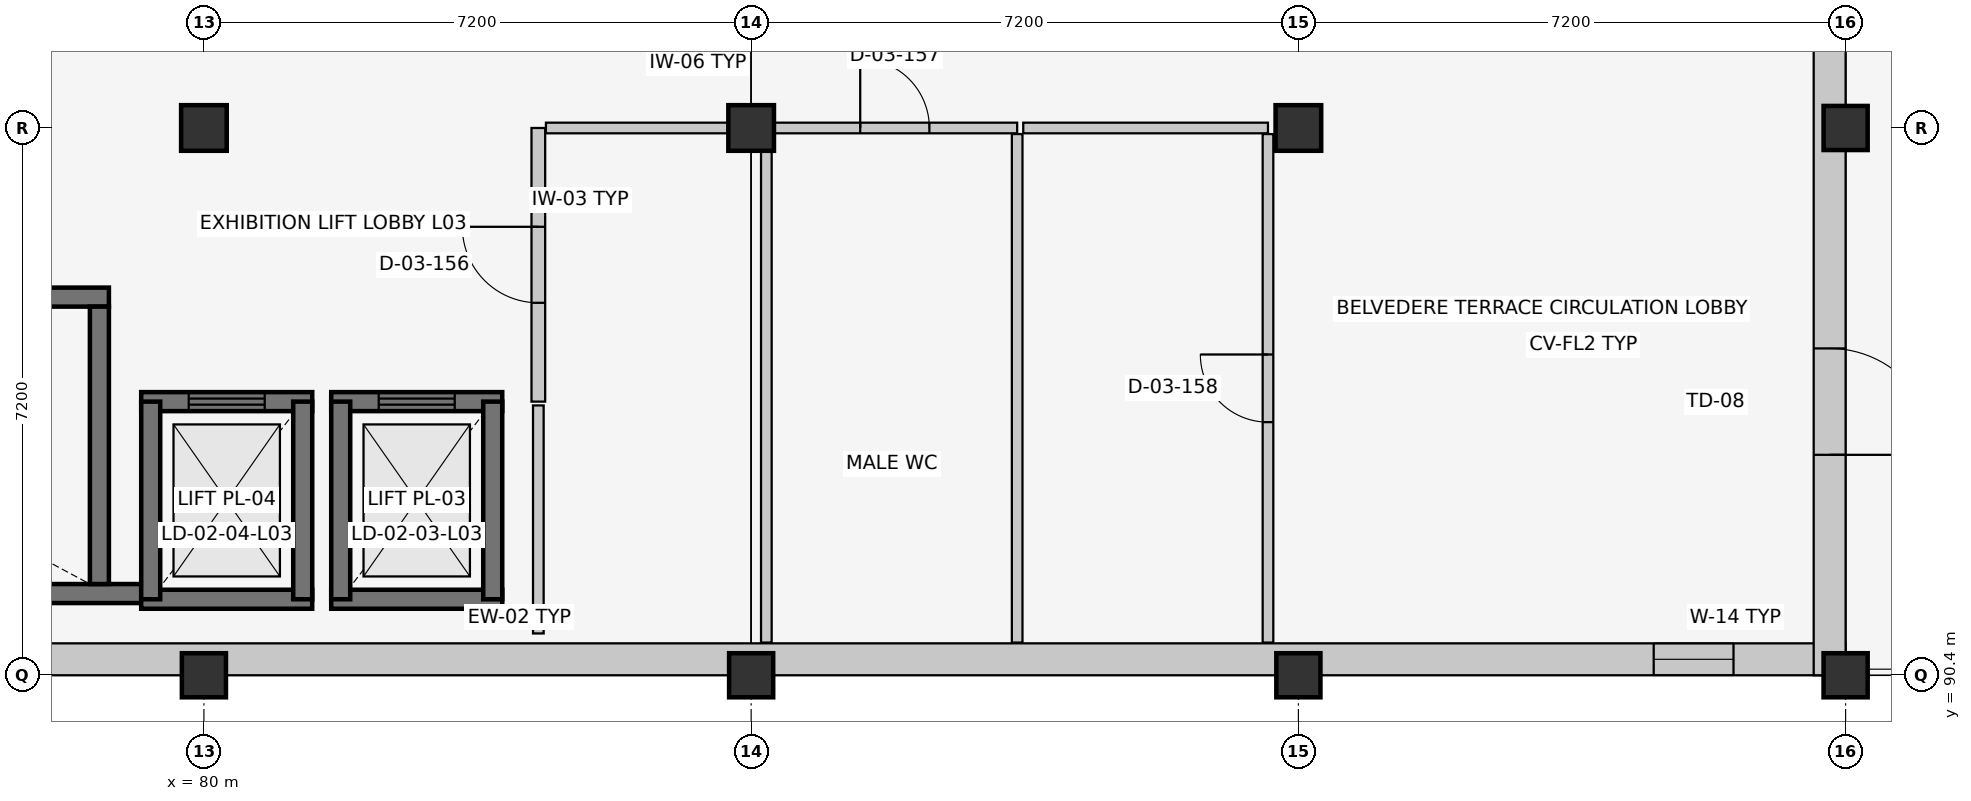
"""IFC4 building model, lengths in metres.
Left out: names, types, materials, properties, quantities, classifications, styles, units other than length and angle.
Written with IfcOpenShell. Run it as: python <this file> out.ifc"""

import sys

from ifc_helpers import new_model, si_unit, direction, frame, frame_2d, origin, origin_2d, place, context, subcontext, project, spatial, rectangle, extrude, element, fill, save


model = new_model("IFC4")
c1 = context("Model", 3, precision=1e-05, world=origin(), true_north=direction((0.0, 1.0)))
c2 = subcontext(c1, "Body", "Model", "MODEL_VIEW")
j1 = project(units=[si_unit("LENGTHUNIT", "METRE"), si_unit("PLANEANGLEUNIT", "RADIAN")], contexts=[c1])
p1 = place(None, origin())
s1 = spatial("IfcSite", under=j1, at=p1, CompositionType="ELEMENT")
p2 = place(p1, origin())
s2 = spatial("IfcBuilding", under=s1, at=p2, CompositionType="ELEMENT")
p3 = place(p2, frame((0.0, 0.0, 13.8)))
s3 = spatial("IfcBuildingStorey", under=s2, at=p3, CompositionType="ELEMENT", Elevation=13.8)
p4 = place(p3, frame((80.0, 90.4, 0.0), z_axis=(0.0, 0.0, 1.0), x_axis=(1.0, 0.0, 0.0)))
e1 = element("IfcColumn", 1, at=p4, inside=s3, PredefinedType="COLUMN", context=c2, shape_type="SweptSolid", body=[
    extrude(rectangle(XDim=0.58, YDim=0.58, at=origin_2d()), origin(), (0.0, 0.0, 1.0), 4.2),
])
p5 = place(p3, frame((80.0, 97.6, 0.0), z_axis=(0.0, 0.0, 1.0), x_axis=(1.0, 0.0, 0.0)))
e2 = element("IfcColumn", 2, at=p5, inside=s3, PredefinedType="COLUMN", context=c2, shape_type="SweptSolid", body=[
    extrude(rectangle(XDim=0.6, YDim=0.6, at=origin_2d()), origin(), (0.0, 0.0, 1.0), 4.2),
])
p6 = place(p3, frame((87.2, 90.4, 0.0), z_axis=(0.0, 0.0, 1.0), x_axis=(1.0, 0.0, 0.0)))
e3 = element("IfcColumn", 3, at=p6, inside=s3, PredefinedType="COLUMN", context=c2, shape_type="SweptSolid", body=[
    extrude(rectangle(XDim=0.58, YDim=0.58, at=origin_2d()), origin(), (0.0, 0.0, 1.0), 4.2),
])
p7 = place(p3, frame((87.2, 97.6, 0.0), z_axis=(0.0, 0.0, 1.0), x_axis=(1.0, 0.0, 0.0)))
e4 = element("IfcColumn", 4, at=p7, inside=s3, PredefinedType="COLUMN", context=c2, shape_type="SweptSolid", body=[
    extrude(rectangle(XDim=0.6, YDim=0.6, at=origin_2d()), origin(), (0.0, 0.0, 1.0), 4.2),
])
p8 = place(p3, frame((94.4, 90.4, 0.0), z_axis=(0.0, 0.0, 1.0), x_axis=(1.0, 0.0, 0.0)))
e5 = element("IfcColumn", 5, at=p8, inside=s3, PredefinedType="COLUMN", context=c2, shape_type="SweptSolid", body=[
    extrude(rectangle(XDim=0.58, YDim=0.58, at=origin_2d()), origin(), (0.0, 0.0, 1.0), 4.2),
])
p9 = place(p3, frame((94.4, 97.6, 0.0), z_axis=(0.0, 0.0, 1.0), x_axis=(1.0, 0.0, 0.0)))
e6 = element("IfcColumn", 6, at=p9, inside=s3, PredefinedType="COLUMN", context=c2, shape_type="SweptSolid", body=[
    extrude(rectangle(XDim=0.6, YDim=0.6, at=origin_2d()), origin(), (0.0, 0.0, 1.0), 4.2),
])
for number, where, z_axis, x_axis in (
    (7, (101.6, 90.4, 0.0), (0.0, 0.0, 1.0), (1.0, 0.0, 0.0)),
    (8, (101.6, 97.6, 0.0), (0.0, 0.0, 1.0), (1.0, 0.0, 0.0)),
):
    element("IfcColumn", number, at=place(p3, frame(where, z_axis=z_axis, x_axis=x_axis)), inside=s3, PredefinedType="COLUMN", context=c2, shape_type="SweptSolid", body=[
        extrude(rectangle(XDim=0.58, YDim=0.58, at=origin_2d()), origin(), (0.0, 0.0, 1.0), 4.2),
    ])
p10 = place(p3, frame((101.6, 90.61, 0.0), z_axis=(0.0, 0.0, 1.0), x_axis=(-1.0, 0.0, 0.0)))
e9 = element("IfcWall", 9, at=p10, inside=s3, PredefinedType="SOLIDWALL", context=c2, shape_type="SweptSolid", body=[
    extrude(rectangle(XDim=36.0, YDim=0.42, at=frame_2d((18.0, 0.0))), origin(), (0.0, 0.0, 1.0), 3.175),
])
p11 = place(p10, frame((1.475, 0.0, 0.9)))
e10 = element("IfcOpeningElement", 10, at=p11, cuts=e9, PredefinedType="OPENING", context=c2, shape_type="SweptSolid", body=[
    extrude(rectangle(XDim=1.05, YDim=1.6, at=frame_2d((0.525, 0.8))), frame((0.0, 0.222, 0.0), z_axis=(0.0, -1.0, 0.0), x_axis=(1.0, 0.0, 0.0)), (0.0, 0.0, 1.0), 0.444),
])
p12 = place(p10, frame((25.44, 0.0, 0.9)))
e11 = element("IfcOpeningElement", 11, at=p12, cuts=e9, PredefinedType="OPENING", context=c2, shape_type="SweptSolid", body=[
    extrude(rectangle(XDim=1.12, YDim=1.75, at=frame_2d((0.56, 0.875))), frame((0.0, 0.222, 0.0), z_axis=(0.0, -1.0, 0.0), x_axis=(1.0, 0.0, 0.0)), (0.0, 0.0, 1.0), 0.444),
])
p13 = place(p10, frame((33.33, 0.0, 0.9)))
e12 = element("IfcOpeningElement", 12, at=p13, cuts=e9, PredefinedType="OPENING", context=c2, shape_type="SweptSolid", body=[
    extrude(rectangle(XDim=1.34, YDim=1.75, at=frame_2d((0.67, 0.875))), frame((0.0, 0.222, 0.0), z_axis=(0.0, -1.0, 0.0), x_axis=(1.0, 0.0, 0.0)), (0.0, 0.0, 1.0), 0.444),
])
p14 = place(p3, frame((101.39, 112.0, 0.0), z_axis=(0.0, 0.0, 1.0), x_axis=(0.0, -1.0, 0.0)))
e13 = element("IfcWall", 13, at=p14, inside=s3, PredefinedType="SOLIDWALL", context=c2, shape_type="SweptSolid", body=[
    extrude(rectangle(XDim=21.6, YDim=0.42, at=frame_2d((10.8, 0.0))), origin(), (0.0, 0.0, 1.0), 3.215),
])
p15 = place(p14, frame((17.3, 0.0, 0.0)))
e14 = element("IfcOpeningElement", 14, at=p15, cuts=e13, PredefinedType="OPENING", context=c2, shape_type="SweptSolid", body=[
    extrude(rectangle(XDim=1.4, YDim=2.2, at=frame_2d((0.7, 1.1))), frame((0.0, 0.222, 0.0), z_axis=(0.0, -1.0, 0.0), x_axis=(1.0, 0.0, 0.0)), (0.0, 0.0, 1.0), 0.444),
])
p16 = place(p14, frame((1.08, 0.0, 0.9)))
e15 = element("IfcOpeningElement", 15, at=p16, cuts=e13, PredefinedType="OPENING", context=c2, shape_type="SweptSolid", body=[
    extrude(rectangle(XDim=1.44, YDim=1.75, at=frame_2d((0.72, 0.875))), frame((0.0, 0.222, 0.0), z_axis=(0.0, -1.0, 0.0), x_axis=(1.0, 0.0, 0.0)), (0.0, 0.0, 1.0), 0.444),
])
p17 = place(p14, frame((4.65, 0.0, 0.9)))
e16 = element("IfcOpeningElement", 16, at=p17, cuts=e13, PredefinedType="OPENING", context=c2, shape_type="SweptSolid", body=[
    extrude(rectangle(XDim=1.5, YDim=1.75, at=frame_2d((0.75, 0.875))), frame((0.0, 0.222, 0.0), z_axis=(0.0, -1.0, 0.0), x_axis=(1.0, 0.0, 0.0)), (0.0, 0.0, 1.0), 0.444),
])
p18 = place(p14, frame((8.55, 0.0, 0.9)))
e17 = element("IfcOpeningElement", 17, at=p18, cuts=e13, PredefinedType="OPENING", context=c2, shape_type="SweptSolid", body=[
    extrude(rectangle(XDim=0.9, YDim=1.35, at=frame_2d((0.45, 0.675))), frame((0.0, 0.222, 0.0), z_axis=(0.0, -1.0, 0.0), x_axis=(1.0, 0.0, 0.0)), (0.0, 0.0, 1.0), 0.444),
])
p19 = place(p14, frame((12.1, 0.0, 0.9)))
e18 = element("IfcOpeningElement", 18, at=p19, cuts=e13, PredefinedType="OPENING", context=c2, shape_type="SweptSolid", body=[
    extrude(rectangle(XDim=1.0, YDim=1.35, at=frame_2d((0.5, 0.675))), frame((0.0, 0.222, 0.0), z_axis=(0.0, -1.0, 0.0), x_axis=(1.0, 0.0, 0.0)), (0.0, 0.0, 1.0), 0.444),
])
p20 = place(p3, frame((69.75, 91.475, 0.0), z_axis=(0.0, 0.0, 1.0), x_axis=(1.0, 0.0, 0.0)))
e19 = element("IfcWall", 19, at=p20, inside=s3, PredefinedType="SHEAR", context=c2, shape_type="SweptSolid", body=[
    extrude(rectangle(XDim=9.57, YDim=0.25, at=frame_2d((4.785, 0.0))), origin(), (0.0, 0.0, 1.0), 3.88),
])
p21 = place(p3, frame((78.75, 95.375, 0.0), z_axis=(0.0, 0.0, 1.0), x_axis=(-1.0, 0.0, 0.0)))
e20 = element("IfcWall", 20, at=p21, inside=s3, PredefinedType="SHEAR", context=c2, shape_type="SweptSolid", body=[
    extrude(rectangle(XDim=9.0, YDim=0.25, at=frame_2d((4.5, 0.0))), origin(), (0.0, 0.0, 1.0), 3.88),
])
p22 = place(p3, frame((78.625, 91.6, 0.0), z_axis=(0.0, 0.0, 1.0), x_axis=(0.0, 1.0, 0.0)))
e21 = element("IfcWall", 21, at=p22, inside=s3, PredefinedType="SHEAR", context=c2, shape_type="SweptSolid", body=[
    extrude(rectangle(XDim=3.65, YDim=0.25, at=frame_2d((1.825, 0.0))), origin(), (0.0, 0.0, 1.0), 3.88),
])
p23 = place(p3, frame((79.175, 91.4, 0.0), z_axis=(0.0, 0.0, 1.0), x_axis=(1.0, 0.0, 0.0)))
e22 = element("IfcWall", 22, at=p23, inside=s3, PredefinedType="SHEAR", context=c2, shape_type="SweptSolid", body=[
    extrude(rectangle(XDim=2.25, YDim=0.25, at=frame_2d((1.125, 0.0))), origin(), (0.0, 0.0, 1.0), 3.88),
])
p24 = place(p3, frame((81.425, 94.0, 0.0), z_axis=(0.0, 0.0, 1.0), x_axis=(-1.0, 0.0, 0.0)))
e23 = element("IfcWall", 23, at=p24, inside=s3, PredefinedType="SHEAR", context=c2, shape_type="SweptSolid", body=[
    extrude(rectangle(XDim=2.25, YDim=0.25, at=frame_2d((1.125, 0.0))), origin(), (0.0, 0.0, 1.0), 3.88),
])
p25 = place(p24, frame((0.625, 0.0, 0.0)))
e24 = element("IfcOpeningElement", 24, at=p25, cuts=e23, PredefinedType="OPENING", context=c2, shape_type="SweptSolid", body=[
    extrude(rectangle(XDim=1.0, YDim=2.15, at=frame_2d((0.5, 1.075))), frame((0.0, 0.137, 0.0), z_axis=(0.0, -1.0, 0.0), x_axis=(1.0, 0.0, 0.0)), (0.0, 0.0, 1.0), 0.274),
])
for number, where, z_axis, x_axis in (
    (25, (79.3, 94.0, 0.0), (0.0, 0.0, 1.0), (0.0, -1.0, 0.0)),
    (26, (81.3, 91.4, 0.0), (0.0, 0.0, 1.0), (0.0, 1.0, 0.0)),
):
    element("IfcWall", number, at=place(p3, frame(where, z_axis=z_axis, x_axis=x_axis)), inside=s3, PredefinedType="SHEAR", context=c2, shape_type="SweptSolid", body=[
        extrude(rectangle(XDim=2.6, YDim=0.25, at=frame_2d((1.3, 0.0))), origin(), (0.0, 0.0, 1.0), 3.88),
    ])
p26 = place(p3, frame((81.675, 91.4, 0.0), z_axis=(0.0, 0.0, 1.0), x_axis=(1.0, 0.0, 0.0)))
e27 = element("IfcWall", 27, at=p26, inside=s3, PredefinedType="SHEAR", context=c2, shape_type="SweptSolid", body=[
    extrude(rectangle(XDim=2.25, YDim=0.25, at=frame_2d((1.125, 0.0))), origin(), (0.0, 0.0, 1.0), 3.88),
])
p27 = place(p3, frame((83.925, 94.0, 0.0), z_axis=(0.0, 0.0, 1.0), x_axis=(-1.0, 0.0, 0.0)))
e28 = element("IfcWall", 28, at=p27, inside=s3, PredefinedType="SHEAR", context=c2, shape_type="SweptSolid", body=[
    extrude(rectangle(XDim=2.25, YDim=0.25, at=frame_2d((1.125, 0.0))), origin(), (0.0, 0.0, 1.0), 3.88),
])
p28 = place(p27, frame((0.625, 0.0, 0.0)))
e29 = element("IfcOpeningElement", 29, at=p28, cuts=e28, PredefinedType="OPENING", context=c2, shape_type="SweptSolid", body=[
    extrude(rectangle(XDim=1.0, YDim=2.15, at=frame_2d((0.5, 1.075))), frame((0.0, 0.137, 0.0), z_axis=(0.0, -1.0, 0.0), x_axis=(1.0, 0.0, 0.0)), (0.0, 0.0, 1.0), 0.274),
])
for number, where, z_axis, x_axis in (
    (30, (81.8, 94.0, 0.0), (0.0, 0.0, 1.0), (0.0, -1.0, 0.0)),
    (31, (83.8, 91.4, 0.0), (0.0, 0.0, 1.0), (0.0, 1.0, 0.0)),
):
    element("IfcWall", number, at=place(p3, frame(where, z_axis=z_axis, x_axis=x_axis)), inside=s3, PredefinedType="SHEAR", context=c2, shape_type="SweptSolid", body=[
        extrude(rectangle(XDim=2.6, YDim=0.25, at=frame_2d((1.3, 0.0))), origin(), (0.0, 0.0, 1.0), 3.88),
    ])
p29 = place(p3, frame((84.4, 94.0, 0.0), z_axis=(0.0, 0.0, 1.0), x_axis=(0.0, 1.0, 0.0)))
e32 = element("IfcWall", 32, at=p29, inside=s3, PredefinedType="PARTITIONING", context=c2, shape_type="SweptSolid", body=[
    extrude(rectangle(XDim=3.6, YDim=0.18, at=frame_2d((1.8, 0.0))), origin(), (0.0, 0.0, 1.0), 3.88),
])
p30 = place(p29, frame((1.3, 0.0, 0.0)))
e33 = element("IfcOpeningElement", 33, at=p30, cuts=e32, PredefinedType="OPENING", context=c2, shape_type="SweptSolid", body=[
    extrude(rectangle(XDim=1.0, YDim=2.1, at=frame_2d((0.5, 1.05))), frame((0.0, 0.102, 0.0), z_axis=(0.0, -1.0, 0.0), x_axis=(1.0, 0.0, 0.0)), (0.0, 0.0, 1.0), 0.204),
])
p31 = place(p3, frame((84.5, 97.6, 0.0), z_axis=(0.0, 0.0, 1.0), x_axis=(1.0, 0.0, 0.0)))
e34 = element("IfcWall", 34, at=p31, inside=s3, PredefinedType="PARTITIONING", context=c2, shape_type="SweptSolid", body=[
    extrude(rectangle(XDim=2.9, YDim=0.14, at=frame_2d((1.45, 0.0))), origin(), (0.0, 0.0, 1.0), 3.005),
])
p32 = place(p3, frame((87.4, 90.83, 0.0), z_axis=(0.0, 0.0, 1.0), x_axis=(0.0, 1.0, 0.0)))
e35 = element("IfcWall", 35, at=p32, inside=s3, PredefinedType="PARTITIONING", context=c2, shape_type="SweptSolid", body=[
    extrude(rectangle(XDim=6.69, YDim=0.14, at=frame_2d((3.345, 0.0))), origin(), (0.0, 0.0, 1.0), 3.255),
])
p33 = place(p3, frame((87.48, 97.6, 0.0), z_axis=(0.0, 0.0, 1.0), x_axis=(1.0, 0.0, 0.0)))
e36 = element("IfcWall", 36, at=p33, inside=s3, PredefinedType="PARTITIONING", context=c2, shape_type="SweptSolid", body=[
    extrude(rectangle(XDim=3.22, YDim=0.14, at=frame_2d((1.61, 0.0))), origin(), (0.0, 0.0, 1.0), 3.205),
])
p34 = place(p33, frame((1.155, 0.0, 0.0)))
e37 = element("IfcOpeningElement", 37, at=p34, cuts=e36, PredefinedType="OPENING", context=c2, shape_type="SweptSolid", body=[
    extrude(rectangle(XDim=0.91, YDim=2.06, at=frame_2d((0.455, 1.03))), frame((0.0, 0.082, 0.0), z_axis=(0.0, -1.0, 0.0), x_axis=(1.0, 0.0, 0.0)), (0.0, 0.0, 1.0), 0.164),
])
p35 = place(p3, frame((90.7, 90.83, 0.0), z_axis=(0.0, 0.0, 1.0), x_axis=(0.0, 1.0, 0.0)))
e38 = element("IfcWall", 38, at=p35, inside=s3, PredefinedType="PARTITIONING", context=c2, shape_type="SweptSolid", body=[
    extrude(rectangle(XDim=6.69, YDim=0.14, at=frame_2d((3.345, 0.0))), origin(), (0.0, 0.0, 1.0), 3.595),
])
p36 = place(p3, frame((90.78, 97.6, 0.0), z_axis=(0.0, 0.0, 1.0), x_axis=(1.0, 0.0, 0.0)))
e39 = element("IfcWall", 39, at=p36, inside=s3, PredefinedType="PARTITIONING", context=c2, shape_type="SweptSolid", body=[
    extrude(rectangle(XDim=3.22, YDim=0.14, at=frame_2d((1.61, 0.0))), origin(), (0.0, 0.0, 1.0), 3.205),
])
p37 = place(p3, frame((94.0, 90.83, 0.0), z_axis=(0.0, 0.0, 1.0), x_axis=(0.0, 1.0, 0.0)))
e40 = element("IfcWall", 40, at=p37, inside=s3, PredefinedType="PARTITIONING", context=c2, shape_type="SweptSolid", body=[
    extrude(rectangle(XDim=6.69, YDim=0.14, at=frame_2d((3.345, 0.0))), origin(), (0.0, 0.0, 1.0), 3.88),
])
p38 = place(p37, frame((2.9, 0.0, 0.0)))
e41 = element("IfcOpeningElement", 41, at=p38, cuts=e40, PredefinedType="OPENING", context=c2, shape_type="SweptSolid", body=[
    extrude(rectangle(XDim=0.89, YDim=2.05, at=frame_2d((0.445, 1.025))), frame((0.0, 0.082, 0.0), z_axis=(0.0, -1.0, 0.0), x_axis=(1.0, 0.0, 0.0)), (0.0, 0.0, 1.0), 0.164),
])
p39 = place(p3, frame((84.4, 90.95, 0.0), z_axis=(0.0, 0.0, 1.0), x_axis=(0.0, 1.0, 0.0)))
e42 = element("IfcWall", 42, at=p39, inside=s3, PredefinedType="PARTITIONING", context=c2, shape_type="SweptSolid", body=[
    extrude(rectangle(XDim=3.0, YDim=0.14, at=frame_2d((1.5, 0.0))), origin(), (0.0, 0.0, 1.0), 3.88),
])
p40 = place(p11, origin())
e43 = element("IfcWindow", 43, at=p40, inside=s3, PartitioningType="SINGLE_PANEL", PredefinedType="WINDOW", context=c2, shape_type="SweptSolid", body=[
    extrude(rectangle(XDim=1.05, YDim=1.6, at=frame_2d((0.525, 0.8))), frame((0.0, 0.03, 0.0), z_axis=(0.0, -1.0, 0.0), x_axis=(1.0, 0.0, 0.0)), (0.0, 0.0, 1.0), 0.06),
])
fill(e10, e43)
p41 = place(p15, origin())
e44 = element("IfcDoor", 44, at=p41, inside=s3, OperationType="SINGLE_SWING_RIGHT", PredefinedType="DOOR", context=c2, shape_type="SweptSolid", body=[
    extrude(rectangle(XDim=1.4, YDim=2.2, at=frame_2d((0.7, 1.1))), frame((0.0, 0.025, 0.0), z_axis=(0.0, -1.0, 0.0), x_axis=(1.0, 0.0, 0.0)), (0.0, 0.0, 1.0), 0.05),
])
fill(e14, e44)
p42 = place(p25, origin())
e45 = element("IfcDoor", 45, at=p42, inside=s3, OperationType="SLIDING_TO_LEFT", PredefinedType="DOOR", context=c2, shape_type="SweptSolid", body=[
    extrude(rectangle(XDim=1.0, YDim=2.15, at=frame_2d((0.5, 1.075))), frame((0.0, 0.025, 0.0), z_axis=(0.0, -1.0, 0.0), x_axis=(1.0, 0.0, 0.0)), (0.0, 0.0, 1.0), 0.05),
])
fill(e24, e45)
p43 = place(p28, origin())
e46 = element("IfcDoor", 46, at=p43, inside=s3, OperationType="SLIDING_TO_LEFT", PredefinedType="DOOR", context=c2, shape_type="SweptSolid", body=[
    extrude(rectangle(XDim=1.0, YDim=2.15, at=frame_2d((0.5, 1.075))), frame((0.0, 0.025, 0.0), z_axis=(0.0, -1.0, 0.0), x_axis=(1.0, 0.0, 0.0)), (0.0, 0.0, 1.0), 0.05),
])
fill(e29, e46)
p44 = place(p30, origin())
e47 = element("IfcDoor", 47, at=p44, inside=s3, OperationType="SINGLE_SWING_RIGHT", PredefinedType="DOOR", context=c2, shape_type="SweptSolid", body=[
    extrude(rectangle(XDim=1.0, YDim=2.1, at=frame_2d((0.5, 1.05))), frame((0.0, 0.025, 0.0), z_axis=(0.0, -1.0, 0.0), x_axis=(1.0, 0.0, 0.0)), (0.0, 0.0, 1.0), 0.05),
])
fill(e33, e47)
p45 = place(p34, origin())
e48 = element("IfcDoor", 48, at=p45, inside=s3, OperationType="SINGLE_SWING_LEFT", PredefinedType="DOOR", context=c2, shape_type="SweptSolid", body=[
    extrude(rectangle(XDim=0.91, YDim=2.06, at=frame_2d((0.455, 1.03))), frame((0.0, 0.025, 0.0), z_axis=(0.0, -1.0, 0.0), x_axis=(1.0, 0.0, 0.0)), (0.0, 0.0, 1.0), 0.05),
])
fill(e37, e48)
p46 = place(p38, origin())
e49 = element("IfcDoor", 49, at=p46, inside=s3, OperationType="SINGLE_SWING_RIGHT", PredefinedType="DOOR", context=c2, shape_type="SweptSolid", body=[
    extrude(rectangle(XDim=0.89, YDim=2.05, at=frame_2d((0.445, 1.025))), frame((0.0, 0.025, 0.0), z_axis=(0.0, -1.0, 0.0), x_axis=(1.0, 0.0, 0.0)), (0.0, 0.0, 1.0), 0.05),
])
fill(e41, e49)
save(model, sys.argv[1])
